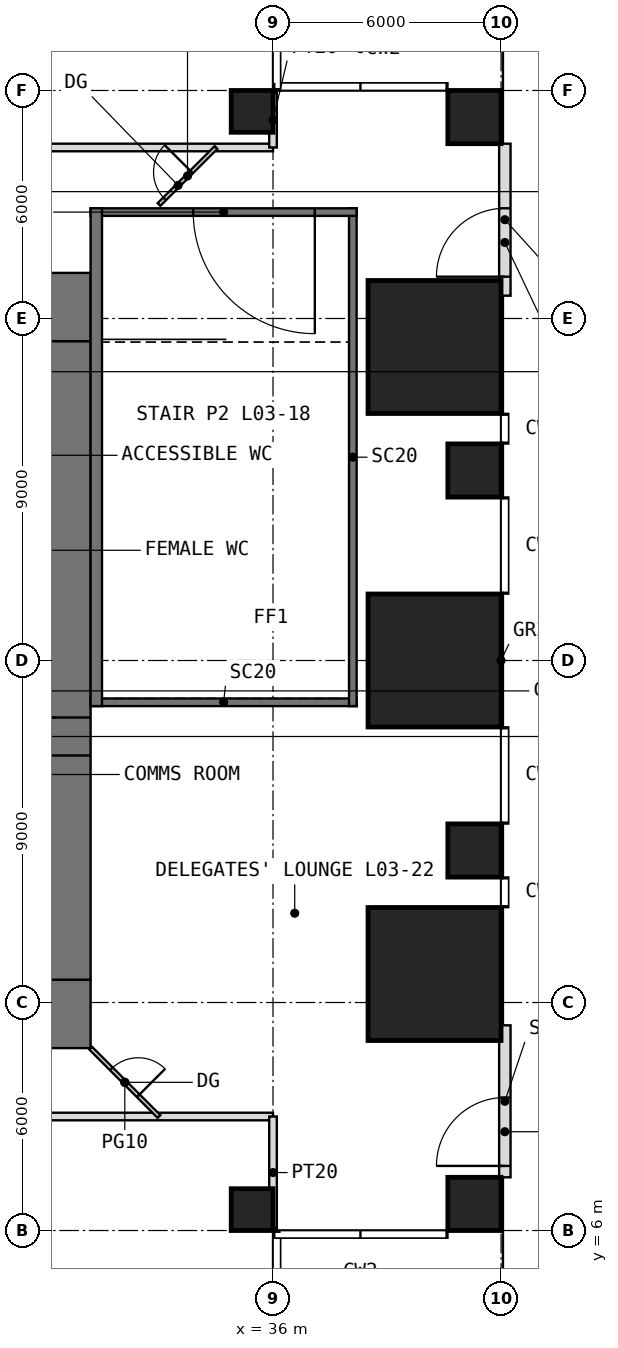
"""IFC4 building model, lengths in metres.
Left out: names, types, materials, properties, quantities, classifications, styles, units other than length and angle.
Written with IfcOpenShell. Run it as: python <this file> out.ifc"""

import sys

from ifc_helpers import new_model, si_unit, direction, frame, frame_2d, origin, origin_2d, place, context, subcontext, project, spatial, rectangle, extrude, element, fill, save


model = new_model("IFC4")
c1 = context("Model", 3, precision=1e-05, world=origin(), true_north=direction((0.0, 1.0)))
c2 = subcontext(c1, "Body", "Model", "MODEL_VIEW")
j1 = project(units=[si_unit("LENGTHUNIT", "METRE"), si_unit("PLANEANGLEUNIT", "RADIAN")], contexts=[c1])
p1 = place(None, origin())
s1 = spatial("IfcSite", under=j1, at=p1, CompositionType="ELEMENT")
p2 = place(p1, origin())
s2 = spatial("IfcBuilding", under=s1, at=p2, CompositionType="ELEMENT")
p3 = place(p2, frame((0.0, 0.0, 18.0)))
s3 = spatial("IfcBuildingStorey", under=s2, at=p3, CompositionType="ELEMENT", Elevation=18.0)
p4 = place(p3, frame((35.45, 6.55, 0.0), z_axis=(0.0, 0.0, 1.0), x_axis=(1.0, 0.0, 0.0)))
e1 = element("IfcColumn", 1, at=p4, inside=s3, PredefinedType="COLUMN", context=c2, shape_type="SweptSolid", body=[
    extrude(rectangle(XDim=1.1, YDim=1.1, at=origin_2d()), origin(), (0.0, 0.0, 1.0), 4.5),
])
p5 = place(p3, frame((41.3, 6.7, 0.0), z_axis=(0.0, 0.0, 1.0), x_axis=(1.0, 0.0, 0.0)))
e2 = element("IfcColumn", 2, at=p5, inside=s3, PredefinedType="COLUMN", context=c2, shape_type="SweptSolid", body=[
    extrude(rectangle(XDim=1.4, YDim=1.4, at=origin_2d()), origin(), (0.0, 0.0, 1.0), 4.5),
])
p6 = place(p3, frame((40.25, 12.75, 0.0), z_axis=(0.0, 0.0, 1.0), x_axis=(1.0, 0.0, 0.0)))
e3 = element("IfcColumn", 3, at=p6, inside=s3, PredefinedType="COLUMN", context=c2, shape_type="SweptSolid", body=[
    extrude(rectangle(XDim=3.5, YDim=3.5, at=origin_2d()), origin(), (0.0, 0.0, 1.0), 4.5),
])
p7 = place(p3, frame((41.3, 16.0, 0.0), z_axis=(0.0, 0.0, 1.0), x_axis=(1.0, 0.0, 0.0)))
e4 = element("IfcColumn", 4, at=p7, inside=s3, PredefinedType="COLUMN", context=c2, shape_type="SweptSolid", body=[
    extrude(rectangle(XDim=1.4, YDim=1.4, at=origin_2d()), origin(), (0.0, 0.0, 1.0), 4.5),
])
p8 = place(p3, frame((40.25, 21.0, 0.0), z_axis=(0.0, 0.0, 1.0), x_axis=(1.0, 0.0, 0.0)))
e5 = element("IfcColumn", 5, at=p8, inside=s3, PredefinedType="COLUMN", context=c2, shape_type="SweptSolid", body=[
    extrude(rectangle(XDim=3.5, YDim=3.5, at=origin_2d()), origin(), (0.0, 0.0, 1.0), 4.5),
])
p9 = place(p3, frame((41.3, 26.0, 0.0), z_axis=(0.0, 0.0, 1.0), x_axis=(1.0, 0.0, 0.0)))
e6 = element("IfcColumn", 6, at=p9, inside=s3, PredefinedType="COLUMN", context=c2, shape_type="SweptSolid", body=[
    extrude(rectangle(XDim=1.4, YDim=1.4, at=origin_2d()), origin(), (0.0, 0.0, 1.0), 4.5),
])
p10 = place(p3, frame((40.25, 29.25, 0.0), z_axis=(0.0, 0.0, 1.0), x_axis=(1.0, 0.0, 0.0)))
e7 = element("IfcColumn", 7, at=p10, inside=s3, PredefinedType="COLUMN", context=c2, shape_type="SweptSolid", body=[
    extrude(rectangle(XDim=3.5, YDim=3.5, at=origin_2d()), origin(), (0.0, 0.0, 1.0), 4.5),
])
p11 = place(p3, frame((35.45, 35.45, 0.0), z_axis=(0.0, 0.0, 1.0), x_axis=(1.0, 0.0, 0.0)))
e8 = element("IfcColumn", 8, at=p11, inside=s3, PredefinedType="COLUMN", context=c2, shape_type="SweptSolid", body=[
    extrude(rectangle(XDim=1.1, YDim=1.1, at=origin_2d()), origin(), (0.0, 0.0, 1.0), 4.5),
])
p12 = place(p3, frame((41.3, 35.3, 0.0), z_axis=(0.0, 0.0, 1.0), x_axis=(1.0, 0.0, 0.0)))
e9 = element("IfcColumn", 9, at=p12, inside=s3, PredefinedType="COLUMN", context=c2, shape_type="SweptSolid", body=[
    extrude(rectangle(XDim=1.4, YDim=1.4, at=origin_2d()), origin(), (0.0, 0.0, 1.0), 4.5),
])
p13 = place(p3, frame((42.1, 7.4, 0.0), z_axis=(0.0, 0.0, 1.0), x_axis=(0.0, 1.0, 0.0)))
e10 = element("IfcWall", 10, at=p13, inside=s3, PredefinedType="USERDEFINED", context=c2, shape_type="SweptSolid", body=[
    extrude(rectangle(XDim=4.0, YDim=0.3, at=frame_2d((2.0, 0.0))), origin(), (0.0, 0.0, 1.0), 4.25),
])
p14 = place(p13, frame((0.3, 0.0, 0.0)))
e11 = element("IfcOpeningElement", 11, at=p14, cuts=e10, PredefinedType="OPENING", context=c2, shape_type="SweptSolid", body=[
    extrude(rectangle(XDim=1.8, YDim=2.7, at=frame_2d((0.9, 1.35))), frame((0.0, 0.16, 0.0), z_axis=(0.0, -1.0, 0.0), x_axis=(1.0, 0.0, 0.0)), (0.0, 0.0, 1.0), 0.32),
])
p15 = place(p3, frame((42.1, 30.6, 0.0), z_axis=(0.0, 0.0, 1.0), x_axis=(0.0, 1.0, 0.0)))
e12 = element("IfcWall", 12, at=p15, inside=s3, PredefinedType="USERDEFINED", context=c2, shape_type="SweptSolid", body=[
    extrude(rectangle(XDim=4.0, YDim=0.3, at=frame_2d((2.0, 0.0))), origin(), (0.0, 0.0, 1.0), 4.25),
])
p16 = place(p15, frame((0.5, 0.0, 0.0)))
e13 = element("IfcOpeningElement", 13, at=p16, cuts=e12, PredefinedType="OPENING", context=c2, shape_type="SweptSolid", body=[
    extrude(rectangle(XDim=1.8, YDim=2.7, at=frame_2d((0.9, 1.35))), frame((0.0, 0.16, 0.0), z_axis=(0.0, -1.0, 0.0), x_axis=(1.0, 0.0, 0.0)), (0.0, 0.0, 1.0), 0.32),
])
p17 = place(p3, frame((10.8, 11.7, -0.2), z_axis=(0.0, 0.0, 1.0), x_axis=(1.0, 0.0, 0.0)))
e14 = element("IfcWall", 14, at=p17, inside=s3, PredefinedType="SHEAR", context=c2, shape_type="SweptSolid", body=[
    extrude(rectangle(XDim=20.4, YDim=1.8, at=frame_2d((10.2, 0.0))), origin(), (0.0, 0.0, 1.0), 4.65),
])
p18 = place(p17, frame((9.2, 0.0, 0.2)))
e15 = element("IfcOpeningElement", 15, at=p18, cuts=e14, PredefinedType="OPENING", context=c2, shape_type="SweptSolid", body=[
    extrude(rectangle(XDim=2.0, YDim=2.2, at=frame_2d((1.0, 1.1))), frame((0.0, 0.91, 0.0), z_axis=(0.0, -1.0, 0.0), x_axis=(1.0, 0.0, 0.0)), (0.0, 0.0, 1.0), 1.82),
])
p19 = place(p3, frame((10.8, 30.3, -0.2), z_axis=(0.0, 0.0, 1.0), x_axis=(1.0, 0.0, 0.0)))
e16 = element("IfcWall", 16, at=p19, inside=s3, PredefinedType="SHEAR", context=c2, shape_type="SweptSolid", body=[
    extrude(rectangle(XDim=20.4, YDim=1.8, at=frame_2d((10.2, 0.0))), origin(), (0.0, 0.0, 1.0), 4.65),
])
p20 = place(p19, frame((9.2, 0.0, 0.2)))
e17 = element("IfcOpeningElement", 17, at=p20, cuts=e16, PredefinedType="OPENING", context=c2, shape_type="SweptSolid", body=[
    extrude(rectangle(XDim=2.0, YDim=2.2, at=frame_2d((1.0, 1.1))), frame((0.0, 0.91, 0.0), z_axis=(0.0, -1.0, 0.0), x_axis=(1.0, 0.0, 0.0)), (0.0, 0.0, 1.0), 1.82),
])
p21 = place(p3, frame((30.3, 12.6, -0.2), z_axis=(0.0, 0.0, 1.0), x_axis=(0.0, 1.0, 0.0)))
e18 = element("IfcWall", 18, at=p21, inside=s3, PredefinedType="SHEAR", context=c2, shape_type="SweptSolid", body=[
    extrude(rectangle(XDim=16.8, YDim=1.8, at=frame_2d((8.4, 0.0))), origin(), (0.0, 0.0, 1.0), 4.65),
])
p22 = place(p21, frame((5.9, 0.0, 0.2)))
e19 = element("IfcOpeningElement", 19, at=p22, cuts=e18, PredefinedType="OPENING", context=c2, shape_type="SweptSolid", body=[
    extrude(rectangle(XDim=1.0, YDim=2.2, at=frame_2d((0.5, 1.1))), frame((0.0, 0.91, 0.0), z_axis=(0.0, -1.0, 0.0), x_axis=(1.0, 0.0, 0.0)), (0.0, 0.0, 1.0), 1.82),
])
p23 = place(p3, frame((31.2, 19.9, -0.2), z_axis=(0.0, 0.0, 1.0), x_axis=(1.0, 0.0, 0.0)))
e20 = element("IfcWall", 20, at=p23, inside=s3, PredefinedType="SOLIDWALL", context=c2, shape_type="SweptSolid", body=[
    extrude(rectangle(XDim=7.0, YDim=0.2, at=frame_2d((3.5, 0.0))), origin(), (0.0, 0.0, 1.0), 4.65),
])
p24 = place(p3, frame((38.1, 19.8, -0.2), z_axis=(0.0, 0.0, 1.0), x_axis=(0.0, 1.0, 0.0)))
e21 = element("IfcWall", 21, at=p24, inside=s3, PredefinedType="SOLIDWALL", context=c2, shape_type="SweptSolid", body=[
    extrude(rectangle(XDim=13.1, YDim=0.2, at=frame_2d((6.55, 0.0))), origin(), (0.0, 0.0, 1.0), 4.65),
])
p25 = place(p3, frame((38.2, 32.8, -0.2), z_axis=(0.0, 0.0, 1.0), x_axis=(-1.0, 0.0, 0.0)))
e22 = element("IfcWall", 22, at=p25, inside=s3, PredefinedType="SOLIDWALL", context=c2, shape_type="SweptSolid", body=[
    extrude(rectangle(XDim=7.0, YDim=0.2, at=frame_2d((3.5, 0.0))), origin(), (0.0, 0.0, 1.0), 4.65),
])
p26 = place(p25, frame((1.1, 0.0, 0.2)))
e23 = element("IfcOpeningElement", 23, at=p26, cuts=e22, PredefinedType="OPENING", context=c2, shape_type="SweptSolid", body=[
    extrude(rectangle(XDim=3.2, YDim=2.4, at=frame_2d((1.6, 1.2))), frame((0.0, 0.11, 0.0), z_axis=(0.0, -1.0, 0.0), x_axis=(1.0, 0.0, 0.0)), (0.0, 0.0, 1.0), 0.22),
])
p27 = place(p3, frame((31.35, 32.9, -0.2), z_axis=(0.0, 0.0, 1.0), x_axis=(0.0, -1.0, 0.0)))
e24 = element("IfcWall", 24, at=p27, inside=s3, PredefinedType="SOLIDWALL", context=c2, shape_type="SweptSolid", body=[
    extrude(rectangle(XDim=13.1, YDim=0.3, at=frame_2d((6.55, 0.0))), origin(), (0.0, 0.0, 1.0), 4.65),
])
p28 = place(p3, frame((23.0, 9.0, 0.0), z_axis=(0.0, 0.0, 1.0), x_axis=(1.0, 0.0, 0.0)))
e25 = element("IfcWall", 25, at=p28, inside=s3, PredefinedType="PARTITIONING", context=c2, shape_type="SweptSolid", body=[
    extrude(rectangle(XDim=13.0, YDim=0.2, at=frame_2d((6.5, 0.0))), origin(), (0.0, 0.0, 1.0), 4.25),
])
p29 = place(p28, frame((6.0, 0.0, 0.0)))
e26 = element("IfcOpeningElement", 26, at=p29, cuts=e25, PredefinedType="OPENING", context=c2, shape_type="SweptSolid", body=[
    extrude(rectangle(XDim=1.0, YDim=2.2, at=frame_2d((0.5, 1.1))), frame((0.0, 0.11, 0.0), z_axis=(0.0, -1.0, 0.0), x_axis=(1.0, 0.0, 0.0)), (0.0, 0.0, 1.0), 0.22),
])
p30 = place(p3, frame((23.0, 34.5, 0.0), z_axis=(0.0, 0.0, 1.0), x_axis=(1.0, 0.0, 0.0)))
e27 = element("IfcWall", 27, at=p30, inside=s3, PredefinedType="PARTITIONING", context=c2, shape_type="SweptSolid", body=[
    extrude(rectangle(XDim=13.0, YDim=0.2, at=frame_2d((6.5, 0.0))), origin(), (0.0, 0.0, 1.0), 4.25),
])
p31 = place(p30, frame((6.0, 0.0, 0.0)))
e28 = element("IfcOpeningElement", 28, at=p31, cuts=e27, PredefinedType="OPENING", context=c2, shape_type="SweptSolid", body=[
    extrude(rectangle(XDim=1.0, YDim=2.2, at=frame_2d((0.5, 1.1))), frame((0.0, 0.11, 0.0), z_axis=(0.0, -1.0, 0.0), x_axis=(1.0, 0.0, 0.0)), (0.0, 0.0, 1.0), 0.22),
])
p32 = place(p3, frame((36.0, 6.05, 0.0), z_axis=(0.0, 0.0, 1.0), x_axis=(0.0, 1.0, 0.0)))
e29 = element("IfcWall", 29, at=p32, inside=s3, PredefinedType="PARTITIONING", context=c2, shape_type="SweptSolid", body=[
    extrude(rectangle(XDim=2.95, YDim=0.2, at=frame_2d((1.475, 0.0))), origin(), (0.0, 0.0, 1.0), 3.63),
])
p33 = place(p3, frame((36.0, 34.5, 0.0), z_axis=(0.0, 0.0, 1.0), x_axis=(0.0, 1.0, 0.0)))
e30 = element("IfcWall", 30, at=p33, inside=s3, PredefinedType="PARTITIONING", context=c2, shape_type="SweptSolid", body=[
    extrude(rectangle(XDim=1.45, YDim=0.2, at=frame_2d((0.725, 0.0))), origin(), (0.0, 0.0, 1.0), 3.63),
])
p34 = place(p3, frame((31.2, 10.8, 0.0), z_axis=(0.0, 0.0, 1.0), x_axis=(0.707106781187, -0.707106781187, 0.0)))
e31 = element("IfcWall", 31, at=p34, inside=s3, PredefinedType="PARTITIONING", context=c2, shape_type="SweptSolid", body=[
    extrude(rectangle(XDim=2.546, YDim=0.1, at=frame_2d((1.273, 0.0))), origin(), (0.0, 0.0, 1.0), 4.25),
])
p35 = place(p34, frame((0.773, 0.0, 0.0)))
e32 = element("IfcOpeningElement", 32, at=p35, cuts=e31, PredefinedType="OPENING", context=c2, shape_type="SweptSolid", body=[
    extrude(rectangle(XDim=1.0, YDim=2.4, at=frame_2d((0.5, 1.2))), frame((0.0, 0.06, 0.0), z_axis=(0.0, -1.0, 0.0), x_axis=(1.0, 0.0, 0.0)), (0.0, 0.0, 1.0), 0.12),
])
p36 = place(p3, frame((33.0, 33.0, 0.0), z_axis=(0.0, 0.0, 1.0), x_axis=(0.707106781187, 0.707106781187, 0.0)))
e33 = element("IfcWall", 33, at=p36, inside=s3, PredefinedType="PARTITIONING", context=c2, shape_type="SweptSolid", body=[
    extrude(rectangle(XDim=2.121, YDim=0.1, at=frame_2d((1.061, 0.0))), origin(), (0.0, 0.0, 1.0), 4.25),
])
p37 = place(p36, frame((0.211, 0.0, 0.0)))
e34 = element("IfcOpeningElement", 34, at=p37, cuts=e33, PredefinedType="OPENING", context=c2, shape_type="SweptSolid", body=[
    extrude(rectangle(XDim=1.0, YDim=2.4, at=frame_2d((0.5, 1.2))), frame((0.0, 0.06, 0.0), z_axis=(0.0, -1.0, 0.0), x_axis=(1.0, 0.0, 0.0)), (0.0, 0.0, 1.0), 0.12),
])
p38 = place(p14, origin())
e35 = element("IfcDoor", 35, at=p38, inside=s3, OperationType="DOUBLE_DOOR_SINGLE_SWING", PredefinedType="DOOR", context=c2, shape_type="SweptSolid", body=[
    extrude(rectangle(XDim=1.8, YDim=2.7, at=frame_2d((0.9, 1.35))), frame((0.0, 0.025, 0.0), z_axis=(0.0, -1.0, 0.0), x_axis=(1.0, 0.0, 0.0)), (0.0, 0.0, 1.0), 0.05),
])
fill(e11, e35)
p39 = place(p16, origin())
e36 = element("IfcDoor", 36, at=p39, inside=s3, OperationType="DOUBLE_DOOR_SINGLE_SWING", PredefinedType="DOOR", context=c2, shape_type="SweptSolid", body=[
    extrude(rectangle(XDim=1.8, YDim=2.7, at=frame_2d((0.9, 1.35))), frame((0.0, 0.025, 0.0), z_axis=(0.0, -1.0, 0.0), x_axis=(1.0, 0.0, 0.0)), (0.0, 0.0, 1.0), 0.05),
])
fill(e13, e36)
p40 = place(p22, origin())
e37 = element("IfcDoor", 37, at=p40, inside=s3, OperationType="SINGLE_SWING_RIGHT", PredefinedType="DOOR", context=c2, shape_type="SweptSolid", body=[
    extrude(rectangle(XDim=1.0, YDim=2.2, at=frame_2d((0.5, 1.1))), frame((0.0, 0.025, 0.0), z_axis=(0.0, -1.0, 0.0), x_axis=(1.0, 0.0, 0.0)), (0.0, 0.0, 1.0), 0.05),
])
fill(e19, e37)
p41 = place(p26, origin())
e38 = element("IfcDoor", 38, at=p41, inside=s3, OperationType="DOUBLE_DOOR_SINGLE_SWING", PredefinedType="DOOR", context=c2, shape_type="SweptSolid", body=[
    extrude(rectangle(XDim=3.2, YDim=2.4, at=frame_2d((1.6, 1.2))), frame((0.0, 0.025, 0.0), z_axis=(0.0, -1.0, 0.0), x_axis=(1.0, 0.0, 0.0)), (0.0, 0.0, 1.0), 0.05),
])
fill(e23, e38)
p42 = place(p35, origin())
e39 = element("IfcDoor", 39, at=p42, inside=s3, OperationType="SINGLE_SWING_RIGHT", PredefinedType="DOOR", context=c2, shape_type="SweptSolid", body=[
    extrude(rectangle(XDim=1.0, YDim=2.4, at=frame_2d((0.5, 1.2))), frame((0.0, 0.025, 0.0), z_axis=(0.0, -1.0, 0.0), x_axis=(1.0, 0.0, 0.0)), (0.0, 0.0, 1.0), 0.05),
])
fill(e32, e39)
p43 = place(p37, origin())
e40 = element("IfcDoor", 40, at=p43, inside=s3, OperationType="SINGLE_SWING_RIGHT", PredefinedType="DOOR", context=c2, shape_type="SweptSolid", body=[
    extrude(rectangle(XDim=1.0, YDim=2.4, at=frame_2d((0.5, 1.2))), frame((0.0, 0.025, 0.0), z_axis=(0.0, -1.0, 0.0), x_axis=(1.0, 0.0, 0.0)), (0.0, 0.0, 1.0), 0.05),
])
fill(e34, e40)
save(model, sys.argv[1])
